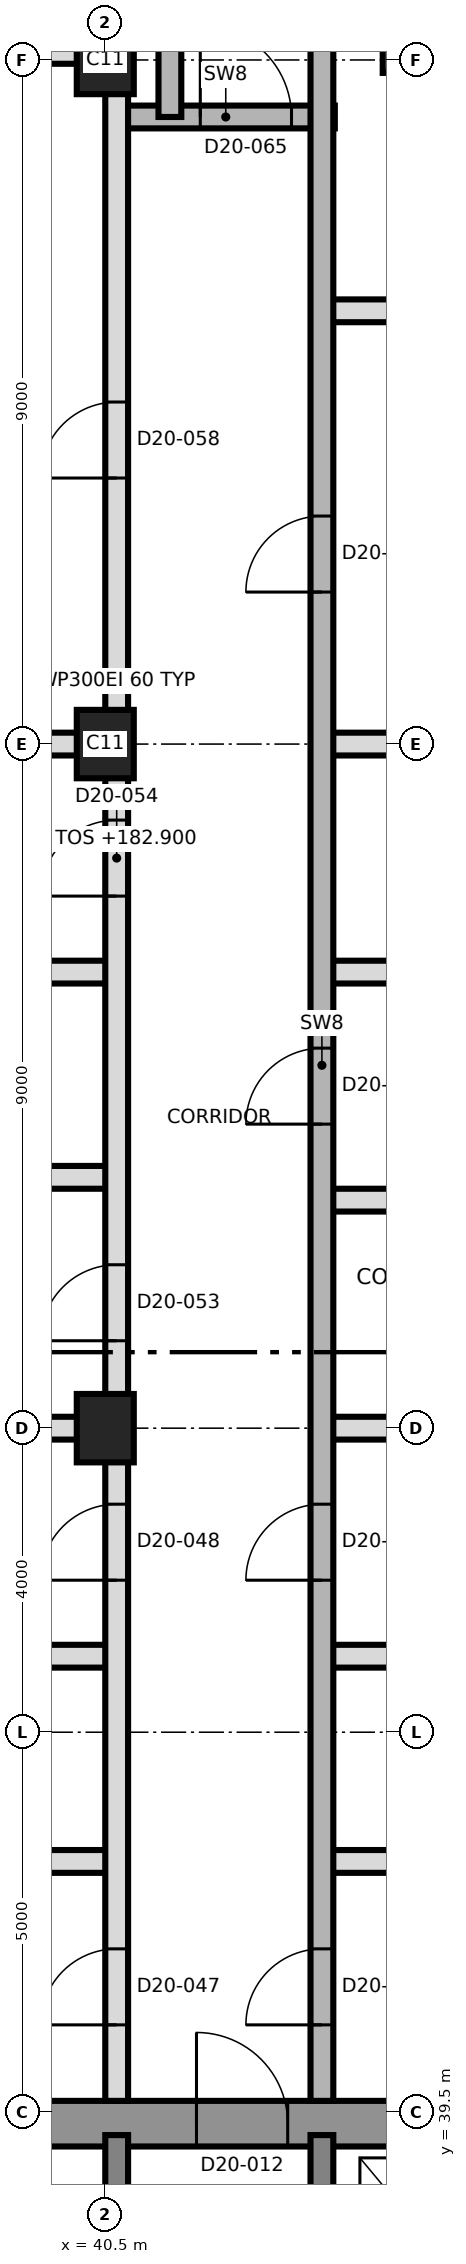
"""IFC4 building model, lengths in metres.
Left out: names, types, materials, properties, quantities, classifications, styles, units other than length and angle.
Written with IfcOpenShell. Run it as: python <this file> out.ifc"""

import sys

from ifc_helpers import new_model, si_unit, direction, frame, frame_2d, origin, origin_2d, place, context, subcontext, project, spatial, rectangle, extrude, element, fill, save


model = new_model("IFC4")
c1 = context("Model", 3, precision=1e-05, world=origin(), true_north=direction((0.0, 1.0)))
c2 = subcontext(c1, "Body", "Model", "MODEL_VIEW")
j1 = project(units=[si_unit("LENGTHUNIT", "METRE"), si_unit("PLANEANGLEUNIT", "RADIAN")], contexts=[c1])
p1 = place(None, origin())
s1 = spatial("IfcSite", under=j1, at=p1, CompositionType="ELEMENT")
p2 = place(p1, origin())
s2 = spatial("IfcBuilding", under=s1, at=p2, CompositionType="ELEMENT")
p3 = place(p2, frame((0.0, 0.0, 182.9)))
s3 = spatial("IfcBuildingStorey", under=s2, at=p3, CompositionType="ELEMENT", Elevation=182.9)
p4 = place(p3, frame((31.2, 39.35, 0.0), z_axis=(0.0, 0.0, 1.0), x_axis=(1.0, 0.0, 0.0)))
e1 = element("IfcWall", 1, at=p4, inside=s3, PredefinedType="SHEAR", context=c2, shape_type="SweptSolid", body=[
    extrude(rectangle(XDim=27.0, YDim=0.6, at=frame_2d((13.5, 0.0))), origin(), (0.0, 0.0, 1.0), 3.7),
])
p5 = place(p4, frame((10.5, 0.0, 0.0)))
e2 = element("IfcOpeningElement", 2, at=p5, cuts=e1, PredefinedType="OPENING", context=c2, shape_type="SweptSolid", body=[
    extrude(rectangle(XDim=1.2, YDim=2.1, at=frame_2d((0.6, 1.05))), frame((0.0, 0.31, 0.0), z_axis=(0.0, -1.0, 0.0), x_axis=(1.0, 0.0, 0.0)), (0.0, 0.0, 1.0), 0.62),
])
for number, where, z_axis, x_axis in (
    (3, (40.65, 33.5, 0.0), (0.0, 0.0, 1.0), (0.0, 1.0, 0.0)),
    (4, (43.35, 33.5, 0.0), (0.0, 0.0, 1.0), (0.0, 1.0, 0.0)),
):
    element("IfcWall", number, at=place(p3, frame(where, z_axis=z_axis, x_axis=x_axis)), inside=s3, PredefinedType="SHEAR", context=c2, shape_type="SweptSolid", body=[
        extrude(rectangle(XDim=5.7, YDim=0.3, at=frame_2d((2.85, 0.0))), origin(), (0.0, 0.0, 1.0), 3.7),
    ])
for number, where, z_axis, x_axis in (
    (5, (40.5, 48.5, 0.0), (0.0, 0.0, 1.0), (0.0, 1.0, 0.0)),
    (6, (40.5, 57.5, 0.0), (0.0, 0.0, 1.0), (0.0, 1.0, 0.0)),
    (7, (40.5, 66.5, 0.0), (0.0, 0.0, 1.0), (0.0, 1.0, 0.0)),
):
    element("IfcColumn", number, at=place(p3, frame(where, z_axis=z_axis, x_axis=x_axis)), inside=s3, PredefinedType="COLUMN", context=c2, shape_type="SweptSolid", body=[
        extrude(rectangle(XDim=0.9, YDim=0.75, at=origin_2d()), origin(), (0.0, 0.0, 1.0), 3.7),
    ])
for number, where, z_axis, x_axis in (
    (8, (37.45, 42.8, 0.0), (0.0, 0.0, 1.0), (1.0, 0.0, 0.0)),
    (9, (43.35, 42.8, 0.0), (0.0, 0.0, 1.0), (1.0, 0.0, 0.0)),
):
    element("IfcWall", number, at=place(p3, frame(where, z_axis=z_axis, x_axis=x_axis)), inside=s3, PredefinedType="PARTITIONING", context=c2, shape_type="SweptSolid", body=[
        extrude(rectangle(XDim=3.2, YDim=0.3, at=frame_2d((1.6, 0.0))), origin(), (0.0, 0.0, 1.0), 3.4),
    ])
p6 = place(p3, frame((29.17, 45.5, 0.0), z_axis=(0.0, 0.0, 1.0), x_axis=(1.0, 0.0, 0.0)))
e10 = element("IfcWall", 10, at=p6, inside=s3, PredefinedType="PARTITIONING", context=c2, shape_type="SweptSolid", body=[
    extrude(rectangle(XDim=11.48, YDim=0.3, at=frame_2d((5.74, 0.0))), origin(), (0.0, 0.0, 1.0), 3.4),
])
p7 = place(p3, frame((43.35, 45.5, 0.0), z_axis=(0.0, 0.0, 1.0), x_axis=(1.0, 0.0, 0.0)))
e11 = element("IfcWall", 11, at=p7, inside=s3, PredefinedType="PARTITIONING", context=c2, shape_type="SweptSolid", body=[
    extrude(rectangle(XDim=8.66, YDim=0.3, at=frame_2d((4.33, 0.0))), origin(), (0.0, 0.0, 1.0), 3.4),
])
p8 = place(p3, frame((29.17, 48.5, 0.0), z_axis=(0.0, 0.0, 1.0), x_axis=(1.0, 0.0, 0.0)))
e12 = element("IfcWall", 12, at=p8, inside=s3, PredefinedType="PARTITIONING", context=c2, shape_type="SweptSolid", body=[
    extrude(rectangle(XDim=11.48, YDim=0.3, at=frame_2d((5.74, 0.0))), origin(), (0.0, 0.0, 1.0), 3.4),
])
p9 = place(p3, frame((43.35, 48.5, 0.0), z_axis=(0.0, 0.0, 1.0), x_axis=(1.0, 0.0, 0.0)))
e13 = element("IfcWall", 13, at=p9, inside=s3, PredefinedType="PARTITIONING", context=c2, shape_type="SweptSolid", body=[
    extrude(rectangle(XDim=8.66, YDim=0.3, at=frame_2d((4.33, 0.0))), origin(), (0.0, 0.0, 1.0), 3.4),
])
p10 = place(p3, frame((43.35, 51.5, 0.0), z_axis=(0.0, 0.0, 1.0), x_axis=(1.0, 0.0, 0.0)))
e14 = element("IfcWall", 14, at=p10, inside=s3, PredefinedType="PARTITIONING", context=c2, shape_type="SweptSolid", body=[
    extrude(rectangle(XDim=3.3, YDim=0.3, at=frame_2d((1.65, 0.0))), origin(), (0.0, 0.0, 1.0), 3.4),
])
p11 = place(p3, frame((37.45, 51.8, 0.0), z_axis=(0.0, 0.0, 1.0), x_axis=(1.0, 0.0, 0.0)))
e15 = element("IfcWall", 15, at=p11, inside=s3, PredefinedType="PARTITIONING", context=c2, shape_type="SweptSolid", body=[
    extrude(rectangle(XDim=3.2, YDim=0.3, at=frame_2d((1.6, 0.0))), origin(), (0.0, 0.0, 1.0), 3.4),
])
p12 = place(p3, frame((29.17, 54.5, 0.0), z_axis=(0.0, 0.0, 1.0), x_axis=(1.0, 0.0, 0.0)))
e16 = element("IfcWall", 16, at=p12, inside=s3, PredefinedType="PARTITIONING", context=c2, shape_type="SweptSolid", body=[
    extrude(rectangle(XDim=11.48, YDim=0.3, at=frame_2d((5.74, 0.0))), origin(), (0.0, 0.0, 1.0), 3.4),
])
p13 = place(p3, frame((43.35, 54.5, 0.0), z_axis=(0.0, 0.0, 1.0), x_axis=(1.0, 0.0, 0.0)))
e17 = element("IfcWall", 17, at=p13, inside=s3, PredefinedType="PARTITIONING", context=c2, shape_type="SweptSolid", body=[
    extrude(rectangle(XDim=3.3, YDim=0.3, at=frame_2d((1.65, 0.0))), origin(), (0.0, 0.0, 1.0), 3.4),
])
p14 = place(p3, frame((29.17, 57.5, 0.0), z_axis=(0.0, 0.0, 1.0), x_axis=(1.0, 0.0, 0.0)))
e18 = element("IfcWall", 18, at=p14, inside=s3, PredefinedType="PARTITIONING", context=c2, shape_type="SweptSolid", body=[
    extrude(rectangle(XDim=11.48, YDim=0.3, at=frame_2d((5.74, 0.0))), origin(), (0.0, 0.0, 1.0), 3.4),
])
p15 = place(p3, frame((43.35, 57.5, 0.0), z_axis=(0.0, 0.0, 1.0), x_axis=(1.0, 0.0, 0.0)))
e19 = element("IfcWall", 19, at=p15, inside=s3, PredefinedType="PARTITIONING", context=c2, shape_type="SweptSolid", body=[
    extrude(rectangle(XDim=8.66, YDim=0.3, at=frame_2d((4.33, 0.0))), origin(), (0.0, 0.0, 1.0), 3.4),
])
p16 = place(p3, frame((43.35, 63.2, 0.0), z_axis=(0.0, 0.0, 1.0), x_axis=(1.0, 0.0, 0.0)))
e20 = element("IfcWall", 20, at=p16, inside=s3, PredefinedType="PARTITIONING", context=c2, shape_type="SweptSolid", body=[
    extrude(rectangle(XDim=8.62, YDim=0.3, at=frame_2d((4.31, 0.0))), origin(), (0.0, 0.0, 1.0), 3.4),
])
p17 = place(p16, frame((4.65, 0.0, 0.0)))
e21 = element("IfcOpeningElement", 21, at=p17, cuts=e20, PredefinedType="OPENING", context=c2, shape_type="SweptSolid", body=[
    extrude(rectangle(XDim=1.0, YDim=2.1, at=frame_2d((0.5, 1.05))), frame((0.0, 0.16, 0.0), z_axis=(0.0, -1.0, 0.0), x_axis=(1.0, 0.0, 0.0)), (0.0, 0.0, 1.0), 0.32),
])
p18 = place(p3, frame((40.65, 65.75, 0.0), z_axis=(0.0, 0.0, 1.0), x_axis=(1.0, 0.0, 0.0)))
e22 = element("IfcWall", 22, at=p18, inside=s3, PredefinedType="SHEAR", context=c2, shape_type="SweptSolid", body=[
    extrude(rectangle(XDim=2.87, YDim=0.3, at=frame_2d((1.435, 0.0))), origin(), (0.0, 0.0, 1.0), 3.4),
])
p19 = place(p18, frame((1.1, 0.0, 0.0)))
e23 = element("IfcOpeningElement", 23, at=p19, cuts=e22, PredefinedType="OPENING", context=c2, shape_type="SweptSolid", body=[
    extrude(rectangle(XDim=1.2, YDim=2.1, at=frame_2d((0.6, 1.05))), frame((0.0, 0.16, 0.0), z_axis=(0.0, -1.0, 0.0), x_axis=(1.0, 0.0, 0.0)), (0.0, 0.0, 1.0), 0.32),
])
p20 = place(p3, frame((44.18, 66.5, 0.0), z_axis=(0.0, 0.0, 1.0), x_axis=(1.0, 0.0, 0.0)))
e24 = element("IfcWall", 24, at=p20, inside=s3, PredefinedType="SOLIDWALL", context=c2, shape_type="SweptSolid", body=[
    extrude(rectangle(XDim=2.67, YDim=0.3, at=frame_2d((1.335, 0.0))), origin(), (0.0, 0.0, 1.0), 3.4),
])
p21 = place(p3, frame((29.17, 66.6, 0.0), z_axis=(0.0, 0.0, 1.0), x_axis=(1.0, 0.0, 0.0)))
e25 = element("IfcWall", 25, at=p21, inside=s3, PredefinedType="PARTITIONING", context=c2, shape_type="SweptSolid", body=[
    extrude(rectangle(XDim=11.48, YDim=0.3, at=frame_2d((5.74, 0.0))), origin(), (0.0, 0.0, 1.0), 3.4),
])
p22 = place(p21, frame((5.83, 0.0, 0.0)))
e26 = element("IfcOpeningElement", 26, at=p22, cuts=e25, PredefinedType="OPENING", context=c2, shape_type="SweptSolid", body=[
    extrude(rectangle(XDim=1.0, YDim=2.1, at=frame_2d((0.5, 1.05))), frame((0.0, 0.16, 0.0), z_axis=(0.0, -1.0, 0.0), x_axis=(1.0, 0.0, 0.0)), (0.0, 0.0, 1.0), 0.32),
])
p23 = place(p3, frame((40.65, 39.65, 0.0), z_axis=(0.0, 0.0, 1.0), x_axis=(0.0, 1.0, 0.0)))
e27 = element("IfcWall", 27, at=p23, inside=s3, PredefinedType="PARTITIONING", context=c2, shape_type="SweptSolid", body=[
    extrude(rectangle(XDim=37.35, YDim=0.3, at=frame_2d((18.675, 0.0))), origin(), (0.0, 0.0, 1.0), 3.4),
])
p24 = place(p23, frame((1.0, 0.0, 0.0)))
e28 = element("IfcOpeningElement", 28, at=p24, cuts=e27, PredefinedType="OPENING", context=c2, shape_type="SweptSolid", body=[
    extrude(rectangle(XDim=1.0, YDim=2.1, at=frame_2d((0.5, 1.05))), frame((0.0, 0.16, 0.0), z_axis=(0.0, -1.0, 0.0), x_axis=(1.0, 0.0, 0.0)), (0.0, 0.0, 1.0), 0.32),
])
p25 = place(p23, frame((6.85, 0.0, 0.0)))
e29 = element("IfcOpeningElement", 29, at=p25, cuts=e27, PredefinedType="OPENING", context=c2, shape_type="SweptSolid", body=[
    extrude(rectangle(XDim=1.0, YDim=2.1, at=frame_2d((0.5, 1.05))), frame((0.0, 0.16, 0.0), z_axis=(0.0, -1.0, 0.0), x_axis=(1.0, 0.0, 0.0)), (0.0, 0.0, 1.0), 0.32),
])
p26 = place(p23, frame((10.0, 0.0, 0.0)))
e30 = element("IfcOpeningElement", 30, at=p26, cuts=e27, PredefinedType="OPENING", context=c2, shape_type="SweptSolid", body=[
    extrude(rectangle(XDim=1.0, YDim=2.1, at=frame_2d((0.5, 1.05))), frame((0.0, 0.16, 0.0), z_axis=(0.0, -1.0, 0.0), x_axis=(1.0, 0.0, 0.0)), (0.0, 0.0, 1.0), 0.32),
])
p27 = place(p23, frame((15.85, 0.0, 0.0)))
e31 = element("IfcOpeningElement", 31, at=p27, cuts=e27, PredefinedType="OPENING", context=c2, shape_type="SweptSolid", body=[
    extrude(rectangle(XDim=1.0, YDim=2.1, at=frame_2d((0.5, 1.05))), frame((0.0, 0.16, 0.0), z_axis=(0.0, -1.0, 0.0), x_axis=(1.0, 0.0, 0.0)), (0.0, 0.0, 1.0), 0.32),
])
p28 = place(p23, frame((21.35, 0.0, 0.0)))
e32 = element("IfcOpeningElement", 32, at=p28, cuts=e27, PredefinedType="OPENING", context=c2, shape_type="SweptSolid", body=[
    extrude(rectangle(XDim=1.0, YDim=2.1, at=frame_2d((0.5, 1.05))), frame((0.0, 0.16, 0.0), z_axis=(0.0, -1.0, 0.0), x_axis=(1.0, 0.0, 0.0)), (0.0, 0.0, 1.0), 0.32),
])
p29 = place(p3, frame((41.35, 65.75, 0.0), z_axis=(0.0, 0.0, 1.0), x_axis=(0.0, 1.0, 0.0)))
e33 = element("IfcWall", 33, at=p29, inside=s3, PredefinedType="SHEAR", context=c2, shape_type="SweptSolid", body=[
    extrude(rectangle(XDim=8.85, YDim=0.3, at=frame_2d((4.425, 0.0))), origin(), (0.0, 0.0, 1.0), 3.4),
])
p30 = place(p3, frame((43.35, 39.65, 0.0), z_axis=(0.0, 0.0, 1.0), x_axis=(0.0, 1.0, 0.0)))
e34 = element("IfcWall", 34, at=p30, inside=s3, PredefinedType="SHEAR", context=c2, shape_type="SweptSolid", body=[
    extrude(rectangle(XDim=27.248, YDim=0.3, at=frame_2d((13.624, 0.0))), origin(), (0.0, 0.0, 1.0), 3.4),
])
p31 = place(p30, frame((1.0, 0.0, 0.0)))
e35 = element("IfcOpeningElement", 35, at=p31, cuts=e34, PredefinedType="OPENING", context=c2, shape_type="SweptSolid", body=[
    extrude(rectangle(XDim=1.0, YDim=2.1, at=frame_2d((0.5, 1.05))), frame((0.0, 0.16, 0.0), z_axis=(0.0, -1.0, 0.0), x_axis=(1.0, 0.0, 0.0)), (0.0, 0.0, 1.0), 0.32),
])
p32 = place(p30, frame((6.85, 0.0, 0.0)))
e36 = element("IfcOpeningElement", 36, at=p32, cuts=e34, PredefinedType="OPENING", context=c2, shape_type="SweptSolid", body=[
    extrude(rectangle(XDim=1.0, YDim=2.1, at=frame_2d((0.5, 1.05))), frame((0.0, 0.16, 0.0), z_axis=(0.0, -1.0, 0.0), x_axis=(1.0, 0.0, 0.0)), (0.0, 0.0, 1.0), 0.32),
])
p33 = place(p30, frame((12.85, 0.0, 0.0)))
e37 = element("IfcOpeningElement", 37, at=p33, cuts=e34, PredefinedType="OPENING", context=c2, shape_type="SweptSolid", body=[
    extrude(rectangle(XDim=1.0, YDim=2.1, at=frame_2d((0.5, 1.05))), frame((0.0, 0.16, 0.0), z_axis=(0.0, -1.0, 0.0), x_axis=(1.0, 0.0, 0.0)), (0.0, 0.0, 1.0), 0.32),
])
p34 = place(p30, frame((19.85, 0.0, 0.0)))
e38 = element("IfcOpeningElement", 38, at=p34, cuts=e34, PredefinedType="OPENING", context=c2, shape_type="SweptSolid", body=[
    extrude(rectangle(XDim=1.0, YDim=2.1, at=frame_2d((0.5, 1.05))), frame((0.0, 0.16, 0.0), z_axis=(0.0, -1.0, 0.0), x_axis=(1.0, 0.0, 0.0)), (0.0, 0.0, 1.0), 0.32),
])
p35 = place(p3, frame((44.3, 66.33, 0.0), z_axis=(0.0, 0.0, 1.0), x_axis=(0.0, 1.0, 0.0)))
e39 = element("IfcWall", 39, at=p35, inside=s3, PredefinedType="SHEAR", context=c2, shape_type="SweptSolid", body=[
    extrude(rectangle(XDim=8.27, YDim=0.3, at=frame_2d((4.135, 0.0))), origin(), (0.0, 0.0, 1.0), 3.4),
])
p36 = place(p5, origin())
e40 = element("IfcDoor", 40, at=p36, inside=s3, OperationType="SINGLE_SWING_RIGHT", PredefinedType="DOOR", context=c2, shape_type="SweptSolid", body=[
    extrude(rectangle(XDim=1.2, YDim=2.1, at=frame_2d((0.6, 1.05))), frame((0.0, 0.025, 0.0), z_axis=(0.0, -1.0, 0.0), x_axis=(1.0, 0.0, 0.0)), (0.0, 0.0, 1.0), 0.05),
])
fill(e2, e40)
p37 = place(p31, origin())
e41 = element("IfcDoor", 41, at=p37, inside=s3, OperationType="SINGLE_SWING_LEFT", PredefinedType="DOOR", context=c2, shape_type="SweptSolid", body=[
    extrude(rectangle(XDim=1.0, YDim=2.1, at=frame_2d((0.5, 1.05))), frame((0.0, 0.025, 0.0), z_axis=(0.0, -1.0, 0.0), x_axis=(1.0, 0.0, 0.0)), (0.0, 0.0, 1.0), 0.05),
])
fill(e35, e41)
p38 = place(p32, origin())
e42 = element("IfcDoor", 42, at=p38, inside=s3, OperationType="SINGLE_SWING_LEFT", PredefinedType="DOOR", context=c2, shape_type="SweptSolid", body=[
    extrude(rectangle(XDim=1.0, YDim=2.1, at=frame_2d((0.5, 1.05))), frame((0.0, 0.025, 0.0), z_axis=(0.0, -1.0, 0.0), x_axis=(1.0, 0.0, 0.0)), (0.0, 0.0, 1.0), 0.05),
])
fill(e36, e42)
p39 = place(p24, origin())
e43 = element("IfcDoor", 43, at=p39, inside=s3, OperationType="SINGLE_SWING_LEFT", PredefinedType="DOOR", context=c2, shape_type="SweptSolid", body=[
    extrude(rectangle(XDim=1.0, YDim=2.1, at=frame_2d((0.5, 1.05))), frame((0.0, 0.025, 0.0), z_axis=(0.0, -1.0, 0.0), x_axis=(1.0, 0.0, 0.0)), (0.0, 0.0, 1.0), 0.05),
])
fill(e28, e43)
p40 = place(p25, origin())
e44 = element("IfcDoor", 44, at=p40, inside=s3, OperationType="SINGLE_SWING_LEFT", PredefinedType="DOOR", context=c2, shape_type="SweptSolid", body=[
    extrude(rectangle(XDim=1.0, YDim=2.1, at=frame_2d((0.5, 1.05))), frame((0.0, 0.025, 0.0), z_axis=(0.0, -1.0, 0.0), x_axis=(1.0, 0.0, 0.0)), (0.0, 0.0, 1.0), 0.05),
])
fill(e29, e44)
p41 = place(p33, origin())
e45 = element("IfcDoor", 45, at=p41, inside=s3, OperationType="SINGLE_SWING_LEFT", PredefinedType="DOOR", context=c2, shape_type="SweptSolid", body=[
    extrude(rectangle(XDim=1.0, YDim=2.1, at=frame_2d((0.5, 1.05))), frame((0.0, 0.025, 0.0), z_axis=(0.0, -1.0, 0.0), x_axis=(1.0, 0.0, 0.0)), (0.0, 0.0, 1.0), 0.05),
])
fill(e37, e45)
p42 = place(p26, origin())
e46 = element("IfcDoor", 46, at=p42, inside=s3, OperationType="SINGLE_SWING_LEFT", PredefinedType="DOOR", context=c2, shape_type="SweptSolid", body=[
    extrude(rectangle(XDim=1.0, YDim=2.1, at=frame_2d((0.5, 1.05))), frame((0.0, 0.025, 0.0), z_axis=(0.0, -1.0, 0.0), x_axis=(1.0, 0.0, 0.0)), (0.0, 0.0, 1.0), 0.05),
])
fill(e30, e46)
p43 = place(p27, origin())
e47 = element("IfcDoor", 47, at=p43, inside=s3, OperationType="SINGLE_SWING_LEFT", PredefinedType="DOOR", context=c2, shape_type="SweptSolid", body=[
    extrude(rectangle(XDim=1.0, YDim=2.1, at=frame_2d((0.5, 1.05))), frame((0.0, 0.025, 0.0), z_axis=(0.0, -1.0, 0.0), x_axis=(1.0, 0.0, 0.0)), (0.0, 0.0, 1.0), 0.05),
])
fill(e31, e47)
p44 = place(p34, origin())
e48 = element("IfcDoor", 48, at=p44, inside=s3, OperationType="SINGLE_SWING_LEFT", PredefinedType="DOOR", context=c2, shape_type="SweptSolid", body=[
    extrude(rectangle(XDim=1.0, YDim=2.1, at=frame_2d((0.5, 1.05))), frame((0.0, 0.025, 0.0), z_axis=(0.0, -1.0, 0.0), x_axis=(1.0, 0.0, 0.0)), (0.0, 0.0, 1.0), 0.05),
])
fill(e38, e48)
p45 = place(p28, origin())
e49 = element("IfcDoor", 49, at=p45, inside=s3, OperationType="SINGLE_SWING_LEFT", PredefinedType="DOOR", context=c2, shape_type="SweptSolid", body=[
    extrude(rectangle(XDim=1.0, YDim=2.1, at=frame_2d((0.5, 1.05))), frame((0.0, 0.025, 0.0), z_axis=(0.0, -1.0, 0.0), x_axis=(1.0, 0.0, 0.0)), (0.0, 0.0, 1.0), 0.05),
])
fill(e32, e49)
p46 = place(p19, origin())
e50 = element("IfcDoor", 50, at=p46, inside=s3, OperationType="SINGLE_SWING_RIGHT", PredefinedType="DOOR", context=c2, shape_type="SweptSolid", body=[
    extrude(rectangle(XDim=1.2, YDim=2.1, at=frame_2d((0.6, 1.05))), frame((0.0, 0.025, 0.0), z_axis=(0.0, -1.0, 0.0), x_axis=(1.0, 0.0, 0.0)), (0.0, 0.0, 1.0), 0.05),
])
fill(e23, e50)
save(model, sys.argv[1])
